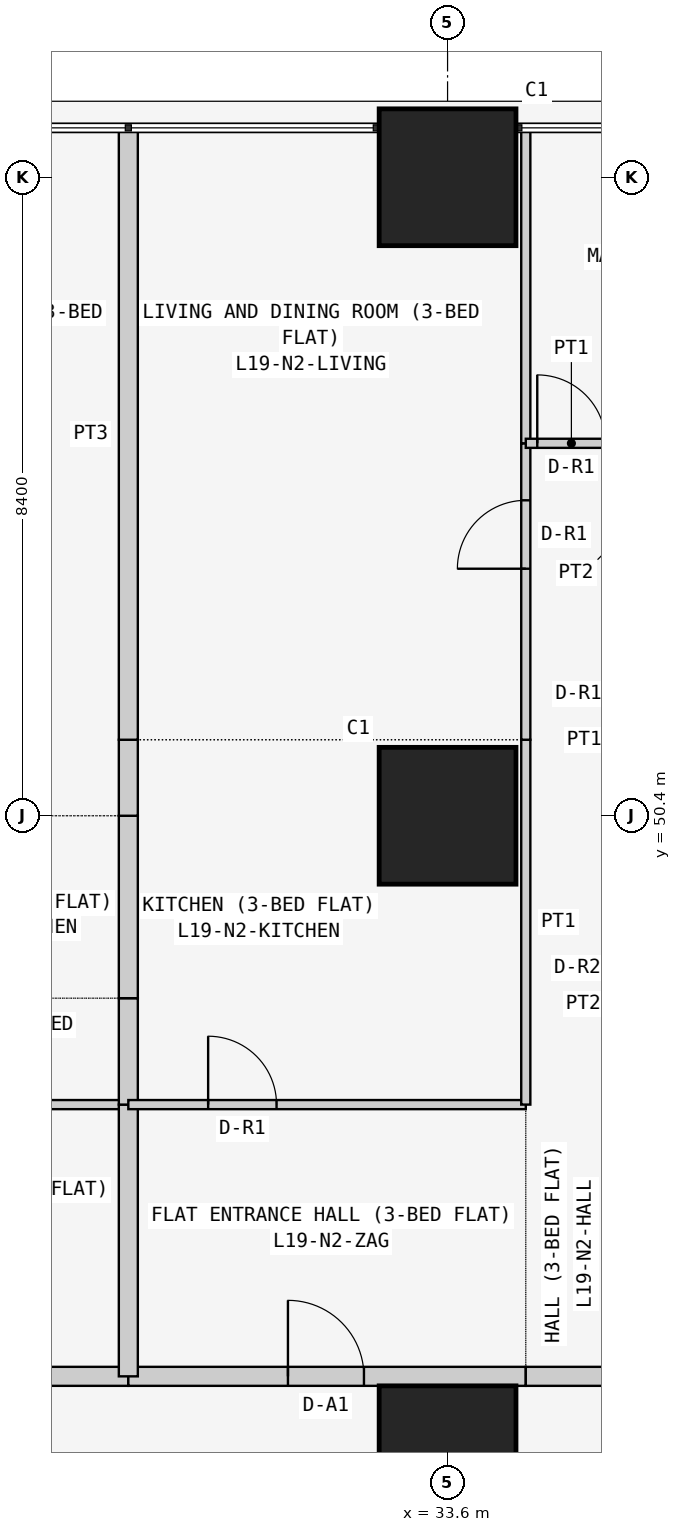
"""IFC4 building model, lengths in metres.
Left out: names, types, materials, properties, quantities, classifications, styles, units other than length and angle.
Written with IfcOpenShell. Run it as: python <this file> out.ifc"""

import sys

from ifc_helpers import new_model, si_unit, direction, frame, frame_2d, origin, origin_2d, place, context, subcontext, project, spatial, rectangle, extrude, element, fill, save


model = new_model("IFC4")
c1 = context("Model", 3, precision=1e-05, world=origin(), true_north=direction((0.0, 1.0)))
c2 = subcontext(c1, "Body", "Model", "MODEL_VIEW")
j1 = project(units=[si_unit("LENGTHUNIT", "METRE"), si_unit("PLANEANGLEUNIT", "RADIAN")], contexts=[c1])
p1 = place(None, origin())
s1 = spatial("IfcSite", under=j1, at=p1, CompositionType="ELEMENT")
p2 = place(p1, origin())
s2 = spatial("IfcBuilding", under=s1, at=p2, CompositionType="ELEMENT")
p3 = place(p2, frame((0.0, 0.0, 77.7)))
s3 = spatial("IfcBuildingStorey", under=s2, at=p3, CompositionType="ELEMENT", Elevation=77.7)
for number, where, z_axis, x_axis in (
    (1, (33.6, 42.0, 0.0), (0.0, 0.0, 1.0), (1.0, 0.0, 0.0)),
    (2, (33.6, 50.4, 0.0), (0.0, 0.0, 1.0), (1.0, 0.0, 0.0)),
    (3, (33.6, 58.8, 0.0), (0.0, 0.0, 1.0), (1.0, 0.0, 0.0)),
):
    element("IfcColumn", number, at=place(p3, frame(where, z_axis=z_axis, x_axis=x_axis)), inside=s3, PredefinedType="COLUMN", context=c2, shape_type="SweptSolid", body=[
        extrude(rectangle(XDim=1.8, YDim=1.8, at=origin_2d()), origin(), (0.0, 0.0, 1.0), 3.6),
    ])
p4 = place(p3, frame((24.171, 43.025, 0.0), z_axis=(0.0, 0.0, 1.0), x_axis=(1.0, 0.0, 0.0)))
e4 = element("IfcWall", 4, at=p4, inside=s3, PredefinedType="PARTITIONING", context=c2, shape_type="SweptSolid", body=[
    extrude(rectangle(XDim=5.229, YDim=0.25, at=frame_2d((2.615, 0.0))), origin(), (0.0, 0.0, 1.0), 3.45),
])
p5 = place(p4, frame((2.129, 0.0, 0.0)))
e5 = element("IfcOpeningElement", 5, at=p5, cuts=e4, PredefinedType="OPENING", context=c2, shape_type="SweptSolid", body=[
    extrude(rectangle(XDim=1.0, YDim=2.1, at=frame_2d((0.5, 1.05))), frame((0.0, 0.135, 0.0), z_axis=(0.0, -1.0, 0.0), x_axis=(1.0, 0.0, 0.0)), (0.0, 0.0, 1.0), 0.27),
])
p6 = place(p3, frame((29.4, 43.025, 0.0), z_axis=(0.0, 0.0, 1.0), x_axis=(1.0, 0.0, 0.0)))
e6 = element("IfcWall", 6, at=p6, inside=s3, PredefinedType="PARTITIONING", context=c2, shape_type="SweptSolid", body=[
    extrude(rectangle(XDim=5.229, YDim=0.25, at=frame_2d((2.615, 0.0))), origin(), (0.0, 0.0, 1.0), 3.45),
])
p7 = place(p6, frame((2.1, 0.0, 0.0)))
e7 = element("IfcOpeningElement", 7, at=p7, cuts=e6, PredefinedType="OPENING", context=c2, shape_type="SweptSolid", body=[
    extrude(rectangle(XDim=1.0, YDim=2.1, at=frame_2d((0.5, 1.05))), frame((0.0, 0.135, 0.0), z_axis=(0.0, -1.0, 0.0), x_axis=(1.0, 0.0, 0.0)), (0.0, 0.0, 1.0), 0.27),
])
p8 = place(p3, frame((34.629, 43.025, 0.0), z_axis=(0.0, 0.0, 1.0), x_axis=(1.0, 0.0, 0.0)))
e8 = element("IfcWall", 8, at=p8, inside=s3, PredefinedType="PARTITIONING", context=c2, shape_type="SweptSolid", body=[
    extrude(rectangle(XDim=1.2, YDim=0.25, at=frame_2d((0.6, 0.0))), origin(), (0.0, 0.0, 1.0), 3.45),
])
p9 = place(p3, frame((29.4, 46.6, 0.0), z_axis=(0.0, 0.0, 1.0), x_axis=(-1.0, 0.0, 0.0)))
e9 = element("IfcWall", 9, at=p9, inside=s3, PredefinedType="PARTITIONING", context=c2, shape_type="SweptSolid", body=[
    extrude(rectangle(XDim=5.229, YDim=0.12, at=frame_2d((2.615, 0.0))), origin(), (0.0, 0.0, 1.0), 3.45),
])
p10 = place(p3, frame((29.4, 43.025, 0.0), z_axis=(0.0, 0.0, 1.0), x_axis=(0.0, 1.0, 0.0)))
e10 = element("IfcWall", 10, at=p10, inside=s3, PredefinedType="PARTITIONING", context=c2, shape_type="SweptSolid", body=[
    extrude(rectangle(XDim=3.575, YDim=0.25, at=frame_2d((1.788, 0.0))), origin(), (0.0, 0.0, 1.0), 2.848),
])
p11 = place(p3, frame((29.4, 46.6, 0.0), z_axis=(0.0, 0.0, 1.0), x_axis=(0.0, 1.0, 0.0)))
e11 = element("IfcWall", 11, at=p11, inside=s3, PredefinedType="PARTITIONING", context=c2, shape_type="SweptSolid", body=[
    extrude(rectangle(XDim=1.4, YDim=0.25, at=frame_2d((0.7, 0.0))), origin(), (0.0, 0.0, 1.0), 2.848),
])
p12 = place(p3, frame((29.4, 48.0, 0.0), z_axis=(0.0, 0.0, 1.0), x_axis=(0.0, 1.0, 0.0)))
e12 = element("IfcWall", 12, at=p12, inside=s3, PredefinedType="PARTITIONING", context=c2, shape_type="SweptSolid", body=[
    extrude(rectangle(XDim=2.4, YDim=0.25, at=frame_2d((1.2, 0.0))), origin(), (0.0, 0.0, 1.0), 2.848),
])
p13 = place(p3, frame((29.4, 50.4, 0.0), z_axis=(0.0, 0.0, 1.0), x_axis=(0.0, 1.0, 0.0)))
e13 = element("IfcWall", 13, at=p13, inside=s3, PredefinedType="PARTITIONING", context=c2, shape_type="SweptSolid", body=[
    extrude(rectangle(XDim=1.0, YDim=0.25, at=frame_2d((0.5, 0.0))), origin(), (0.0, 0.0, 1.0), 2.848),
])
p14 = place(p3, frame((29.4, 51.4, 0.0), z_axis=(0.0, 0.0, 1.0), x_axis=(0.0, 1.0, 0.0)))
e14 = element("IfcWall", 14, at=p14, inside=s3, PredefinedType="PARTITIONING", context=c2, shape_type="SweptSolid", body=[
    extrude(rectangle(XDim=8.05, YDim=0.25, at=frame_2d((4.025, 0.0))), origin(), (0.0, 0.0, 1.0), 2.848),
])
p15 = place(p3, frame((29.4, 46.6, 0.0), z_axis=(0.0, 0.0, 1.0), x_axis=(1.0, 0.0, 0.0)))
e15 = element("IfcWall", 15, at=p15, inside=s3, PredefinedType="PARTITIONING", context=c2, shape_type="SweptSolid", body=[
    extrude(rectangle(XDim=5.229, YDim=0.12, at=frame_2d((2.615, 0.0))), origin(), (0.0, 0.0, 1.0), 3.45),
])
p16 = place(p15, frame((1.05, 0.0, 0.0)))
e16 = element("IfcOpeningElement", 16, at=p16, cuts=e15, PredefinedType="OPENING", context=c2, shape_type="SweptSolid", body=[
    extrude(rectangle(XDim=0.9, YDim=2.1, at=frame_2d((0.45, 1.05))), frame((0.0, 0.07, 0.0), z_axis=(0.0, -1.0, 0.0), x_axis=(1.0, 0.0, 0.0)), (0.0, 0.0, 1.0), 0.14),
])
p17 = place(p3, frame((34.629, 51.4, 0.0), z_axis=(0.0, 0.0, 1.0), x_axis=(0.0, -1.0, 0.0)))
e17 = element("IfcWall", 17, at=p17, inside=s3, PredefinedType="PARTITIONING", context=c2, shape_type="SweptSolid", body=[
    extrude(rectangle(XDim=4.8, YDim=0.12, at=frame_2d((2.4, 0.0))), origin(), (0.0, 0.0, 1.0), 3.45),
])
p18 = place(p3, frame((34.629, 55.3, 0.0), z_axis=(0.0, 0.0, 1.0), x_axis=(0.0, -1.0, 0.0)))
e18 = element("IfcWall", 18, at=p18, inside=s3, PredefinedType="PARTITIONING", context=c2, shape_type="SweptSolid", body=[
    extrude(rectangle(XDim=3.9, YDim=0.12, at=frame_2d((1.95, 0.0))), origin(), (0.0, 0.0, 1.0), 3.45),
])
p19 = place(p18, frame((0.75, 0.0, 0.0)))
e19 = element("IfcOpeningElement", 19, at=p19, cuts=e18, PredefinedType="OPENING", context=c2, shape_type="SweptSolid", body=[
    extrude(rectangle(XDim=0.9, YDim=2.1, at=frame_2d((0.45, 1.05))), frame((0.0, 0.07, 0.0), z_axis=(0.0, -1.0, 0.0), x_axis=(1.0, 0.0, 0.0)), (0.0, 0.0, 1.0), 0.14),
])
p20 = place(p3, frame((34.629, 59.45, 0.0), z_axis=(0.0, 0.0, 1.0), x_axis=(0.0, -1.0, 0.0)))
e20 = element("IfcWall", 20, at=p20, inside=s3, PredefinedType="PARTITIONING", context=c2, shape_type="SweptSolid", body=[
    extrude(rectangle(XDim=4.15, YDim=0.12, at=frame_2d((2.075, 0.0))), origin(), (0.0, 0.0, 1.0), 3.45),
])
p21 = place(p3, frame((34.629, 55.3, 0.0), z_axis=(0.0, 0.0, 1.0), x_axis=(1.0, 0.0, 0.0)))
e21 = element("IfcWall", 21, at=p21, inside=s3, PredefinedType="PARTITIONING", context=c2, shape_type="SweptSolid", body=[
    extrude(rectangle(XDim=1.2, YDim=0.12, at=frame_2d((0.6, 0.0))), origin(), (0.0, 0.0, 1.0), 3.45),
])
p22 = place(p21, frame((0.151, 0.0, 0.0)))
e22 = element("IfcOpeningElement", 22, at=p22, cuts=e21, PredefinedType="OPENING", context=c2, shape_type="SweptSolid", body=[
    extrude(rectangle(XDim=0.9, YDim=2.1, at=frame_2d((0.45, 1.05))), frame((0.0, 0.07, 0.0), z_axis=(0.0, -1.0, 0.0), x_axis=(1.0, 0.0, 0.0)), (0.0, 0.0, 1.0), 0.14),
])
p23 = place(p7, origin())
e23 = element("IfcDoor", 23, at=p23, inside=s3, OperationType="SINGLE_SWING_LEFT", PredefinedType="DOOR", context=c2, shape_type="SweptSolid", body=[
    extrude(rectangle(XDim=1.0, YDim=2.1, at=frame_2d((0.5, 1.05))), frame((0.0, 0.025, 0.0), z_axis=(0.0, -1.0, 0.0), x_axis=(1.0, 0.0, 0.0)), (0.0, 0.0, 1.0), 0.05),
])
fill(e7, e23)
p24 = place(p16, origin())
e24 = element("IfcDoor", 24, at=p24, inside=s3, OperationType="SINGLE_SWING_LEFT", PredefinedType="DOOR", context=c2, shape_type="SweptSolid", body=[
    extrude(rectangle(XDim=0.9, YDim=2.1, at=frame_2d((0.45, 1.05))), frame((0.0, 0.025, 0.0), z_axis=(0.0, -1.0, 0.0), x_axis=(1.0, 0.0, 0.0)), (0.0, 0.0, 1.0), 0.05),
])
fill(e16, e24)
p25 = place(p19, frame((0.9, 0.0, 0.0), z_axis=(0.0, 0.0, 1.0), x_axis=(-1.0, 0.0, 0.0)))
e25 = element("IfcDoor", 25, at=p25, inside=s3, OperationType="SINGLE_SWING_LEFT", PredefinedType="DOOR", context=c2, shape_type="SweptSolid", body=[
    extrude(rectangle(XDim=0.9, YDim=2.1, at=frame_2d((0.45, 1.05))), frame((0.0, 0.025, 0.0), z_axis=(0.0, -1.0, 0.0), x_axis=(1.0, 0.0, 0.0)), (0.0, 0.0, 1.0), 0.05),
])
fill(e19, e25)
p26 = place(p22, origin())
e26 = element("IfcDoor", 26, at=p26, inside=s3, OperationType="SINGLE_SWING_LEFT", PredefinedType="DOOR", context=c2, shape_type="SweptSolid", body=[
    extrude(rectangle(XDim=0.9, YDim=2.1, at=frame_2d((0.45, 1.05))), frame((0.0, 0.025, 0.0), z_axis=(0.0, -1.0, 0.0), x_axis=(1.0, 0.0, 0.0)), (0.0, 0.0, 1.0), 0.05),
])
fill(e22, e26)
save(model, sys.argv[1])
